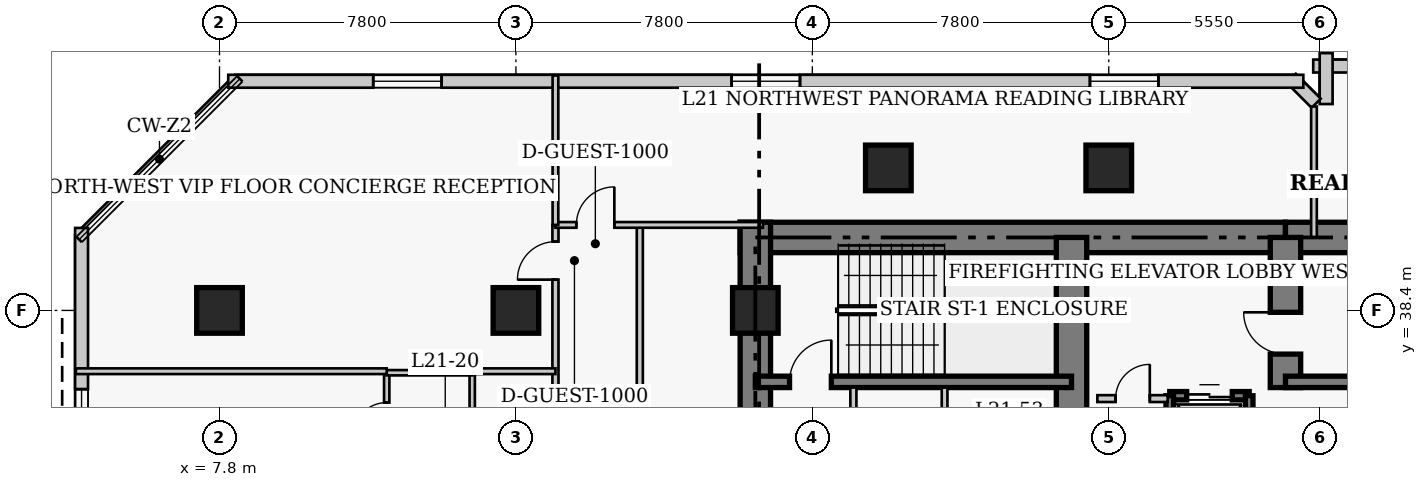
"""IFC4 building model, lengths in metres.
Left out: names, types, materials, properties, quantities, classifications, styles, units other than length and angle.
Written with IfcOpenShell. Run it as: python <this file> out.ifc"""

import sys

from ifc_helpers import new_model, si_unit, direction, frame, frame_2d, origin, origin_2d, place, context, subcontext, project, spatial, rectangle, extrude, element, fill, save


model = new_model("IFC4")
c1 = context("Model", 3, precision=1e-05, world=origin(), true_north=direction((0.0, 1.0)))
c2 = subcontext(c1, "Body", "Model", "MODEL_VIEW")
j1 = project(units=[si_unit("LENGTHUNIT", "METRE"), si_unit("PLANEANGLEUNIT", "RADIAN")], contexts=[c1])
p1 = place(None, origin())
s1 = spatial("IfcSite", under=j1, at=p1, CompositionType="ELEMENT")
p2 = place(p1, origin())
s2 = spatial("IfcBuilding", under=s1, at=p2, CompositionType="ELEMENT")
p3 = place(p2, frame((0.0, 0.0, 88.0)))
s3 = spatial("IfcBuildingStorey", under=s2, at=p3, CompositionType="ELEMENT", Elevation=88.0)
p4 = place(p3, frame((21.5, 40.32, 0.0), z_axis=(0.0, 0.0, 1.0), x_axis=(1.0, 0.0, 0.0)))
e1 = element("IfcWall", 1, at=p4, inside=s3, PredefinedType="SHEAR", context=c2, shape_type="SweptSolid", body=[
    extrude(rectangle(XDim=14.35, YDim=0.8, at=frame_2d((7.175, 0.0))), origin(), (0.0, 0.0, 1.0), 3.8),
])
p5 = place(p3, frame((35.85, 40.32, 0.0), z_axis=(0.0, 0.0, 1.0), x_axis=(1.0, 0.0, 0.0)))
e2 = element("IfcWall", 2, at=p5, inside=s3, PredefinedType="SHEAR", context=c2, shape_type="SweptSolid", body=[
    extrude(rectangle(XDim=12.6, YDim=0.8, at=frame_2d((6.3, 0.0))), origin(), (0.0, 0.0, 1.0), 3.8),
])
p6 = place(p3, frame((21.9, 27.05, 0.0), z_axis=(0.0, 0.0, 1.0), x_axis=(0.0, 1.0, 0.0)))
e3 = element("IfcWall", 3, at=p6, inside=s3, PredefinedType="SHEAR", context=c2, shape_type="SweptSolid", body=[
    extrude(rectangle(XDim=13.67, YDim=0.8, at=frame_2d((6.835, 0.0))), origin(), (0.0, 0.0, 1.0), 3.8),
])
p7 = place(p3, frame((30.22, 33.15, 0.0), z_axis=(0.0, 0.0, 1.0), x_axis=(0.0, 1.0, 0.0)))
e4 = element("IfcWall", 4, at=p7, inside=s3, PredefinedType="SHEAR", context=c2, shape_type="SweptSolid", body=[
    extrude(rectangle(XDim=7.17, YDim=0.8, at=frame_2d((3.585, 0.0))), origin(), (0.0, 0.0, 1.0), 3.8),
])
p8 = place(p3, frame((35.85, 36.37, 0.0), z_axis=(0.0, 0.0, 1.0), x_axis=(0.0, 1.0, 0.0)))
e5 = element("IfcWall", 5, at=p8, inside=s3, PredefinedType="SHEAR", context=c2, shape_type="SweptSolid", body=[
    extrude(rectangle(XDim=3.95, YDim=0.8, at=frame_2d((1.975, 0.0))), origin(), (0.0, 0.0, 1.0), 3.8),
])
p9 = place(p8, frame((0.88, 0.0, 0.0)))
e6 = element("IfcOpeningElement", 6, at=p9, cuts=e5, PredefinedType="OPENING", context=c2, shape_type="SweptSolid", body=[
    extrude(rectangle(XDim=1.1, YDim=2.15, at=frame_2d((0.55, 1.075))), frame((0.0, 0.41, 0.0), z_axis=(0.0, -1.0, 0.0), x_axis=(1.0, 0.0, 0.0)), (0.0, 0.0, 1.0), 0.82),
])
p10 = place(p3, frame((21.9, 36.52, 0.0), z_axis=(0.0, 0.0, 1.0), x_axis=(1.0, 0.0, 0.0)))
e7 = element("IfcWall", 7, at=p10, inside=s3, PredefinedType="SHEAR", context=c2, shape_type="SweptSolid", body=[
    extrude(rectangle(XDim=8.32, YDim=0.3, at=frame_2d((4.16, 0.0))), origin(), (0.0, 0.0, 1.0), 3.8),
])
p11 = place(p10, frame((0.9, 0.0, 0.0)))
e8 = element("IfcOpeningElement", 8, at=p11, cuts=e7, PredefinedType="OPENING", context=c2, shape_type="SweptSolid", body=[
    extrude(rectangle(XDim=1.1, YDim=2.15, at=frame_2d((0.55, 1.075))), frame((0.0, 0.16, 0.0), z_axis=(0.0, -1.0, 0.0), x_axis=(1.0, 0.0, 0.0)), (0.0, 0.0, 1.0), 0.32),
])
p12 = place(p3, frame((35.85, 36.52, 0.0), z_axis=(0.0, 0.0, 1.0), x_axis=(1.0, 0.0, 0.0)))
e9 = element("IfcWall", 9, at=p12, inside=s3, PredefinedType="SHEAR", context=c2, shape_type="SweptSolid", body=[
    extrude(rectangle(XDim=8.33, YDim=0.3, at=frame_2d((4.165, 0.0))), origin(), (0.0, 0.0, 1.0), 3.8),
])
for number, where, z_axis, x_axis in (
    (10, (7.8, 38.4, 0.0), (0.0, 0.0, 1.0), (1.0, 0.0, 0.0)),
    (11, (15.6, 38.4, 0.0), (0.0, 0.0, 1.0), (1.0, 0.0, 0.0)),
    (12, (21.9, 38.4, 0.0), (0.0, 0.0, 1.0), (1.0, 0.0, 0.0)),
    (13, (25.4, 42.15, 0.0), (0.0, 0.0, 1.0), (1.0, 0.0, 0.0)),
    (14, (31.2, 42.15, 0.0), (0.0, 0.0, 1.0), (1.0, 0.0, 0.0)),
):
    element("IfcColumn", number, at=place(p3, frame(where, z_axis=z_axis, x_axis=x_axis)), inside=s3, PredefinedType="COLUMN", context=c2, shape_type="SweptSolid", body=[
        extrude(rectangle(XDim=1.2, YDim=1.2, at=origin_2d()), origin(), (0.0, 0.0, 1.0), 3.8),
    ])
p13 = place(p3, frame((41.42, 44.83, 0.0), z_axis=(0.0, 0.0, 1.0), x_axis=(-1.0, 0.0, 0.0)))
e15 = element("IfcWall", 15, at=p13, inside=s3, PredefinedType="SOLIDWALL", context=c2, shape_type="SweptSolid", body=[
    extrude(rectangle(XDim=4.84, YDim=0.34, at=frame_2d((2.42, 0.0))), origin(), (0.0, 0.0, 1.0), 3.54),
])
p14 = place(p13, frame((1.52, 0.0, 0.85)))
e16 = element("IfcOpeningElement", 16, at=p14, cuts=e15, PredefinedType="OPENING", context=c2, shape_type="SweptSolid", body=[
    extrude(rectangle(XDim=1.8, YDim=1.8, at=frame_2d((0.9, 0.9))), frame((0.0, 0.18, 0.0), z_axis=(0.0, -1.0, 0.0), x_axis=(1.0, 0.0, 0.0)), (0.0, 0.0, 1.0), 0.36),
])
p15 = place(p3, frame((36.92, 45.17, 0.0), z_axis=(0.0, 0.0, 1.0), x_axis=(0.0, -1.0, 0.0)))
e17 = element("IfcWall", 17, at=p15, inside=s3, PredefinedType="SOLIDWALL", context=c2, shape_type="SweptSolid", body=[
    extrude(rectangle(XDim=1.34, YDim=0.34, at=frame_2d((0.67, 0.0))), origin(), (0.0, 0.0, 1.0), 3.54),
])
p16 = place(p3, frame((36.658, 43.852, 0.0), z_axis=(0.0, 0.0, 1.0), x_axis=(-0.707238225886, 0.706975312048, 0.0)))
e18 = element("IfcWall", 18, at=p16, inside=s3, PredefinedType="SOLIDWALL", context=c2, shape_type="SweptSolid", body=[
    extrude(rectangle(XDim=0.929, YDim=0.34, at=frame_2d((0.464, 0.0))), origin(), (0.0, 0.0, 1.0), 3.54),
])
p17 = place(p3, frame((36.32, 44.43, 0.0), z_axis=(0.0, 0.0, 1.0), x_axis=(-1.0, 0.0, 0.0)))
e19 = element("IfcWall", 19, at=p17, inside=s3, PredefinedType="SOLIDWALL", context=c2, shape_type="SweptSolid", body=[
    extrude(rectangle(XDim=28.29, YDim=0.34, at=frame_2d((14.145, 0.0))), origin(), (0.0, 0.0, 1.0), 3.54),
])
p18 = place(p17, frame((3.815, 0.0, 0.85)))
e20 = element("IfcOpeningElement", 20, at=p18, cuts=e19, PredefinedType="OPENING", context=c2, shape_type="SweptSolid", body=[
    extrude(rectangle(XDim=1.8, YDim=1.8, at=frame_2d((0.9, 0.9))), frame((0.0, 0.18, 0.0), z_axis=(0.0, -1.0, 0.0), x_axis=(1.0, 0.0, 0.0)), (0.0, 0.0, 1.0), 0.36),
])
p19 = place(p17, frame((13.245, 0.0, 0.85)))
e21 = element("IfcOpeningElement", 21, at=p19, cuts=e19, PredefinedType="OPENING", context=c2, shape_type="SweptSolid", body=[
    extrude(rectangle(XDim=1.8, YDim=1.8, at=frame_2d((0.9, 0.9))), frame((0.0, 0.18, 0.0), z_axis=(0.0, -1.0, 0.0), x_axis=(1.0, 0.0, 0.0)), (0.0, 0.0, 1.0), 0.36),
])
p20 = place(p17, frame((22.675, 0.0, 0.85)))
e22 = element("IfcOpeningElement", 22, at=p20, cuts=e19, PredefinedType="OPENING", context=c2, shape_type="SweptSolid", body=[
    extrude(rectangle(XDim=1.8, YDim=1.8, at=frame_2d((0.9, 0.9))), frame((0.0, 0.18, 0.0), z_axis=(0.0, -1.0, 0.0), x_axis=(1.0, 0.0, 0.0)), (0.0, 0.0, 1.0), 0.36),
])
p21 = place(p3, frame((4.17, 40.57, 0.0), z_axis=(0.0, 0.0, 1.0), x_axis=(0.0, -1.0, 0.0)))
e23 = element("IfcWall", 23, at=p21, inside=s3, PredefinedType="SOLIDWALL", context=c2, shape_type="SweptSolid", body=[
    extrude(rectangle(XDim=31.94, YDim=0.34, at=frame_2d((15.97, 0.0))), origin(), (0.0, 0.0, 1.0), 3.54),
])
p22 = place(p21, frame((4.242, 0.0, 0.85)))
e24 = element("IfcOpeningElement", 24, at=p22, cuts=e23, PredefinedType="OPENING", context=c2, shape_type="SweptSolid", body=[
    extrude(rectangle(XDim=1.8, YDim=1.8, at=frame_2d((0.9, 0.9))), frame((0.0, 0.18, 0.0), z_axis=(0.0, -1.0, 0.0), x_axis=(1.0, 0.0, 0.0)), (0.0, 0.0, 1.0), 0.36),
])
p23 = place(p21, frame((12.228, 0.0, 0.85)))
e25 = element("IfcOpeningElement", 25, at=p23, cuts=e23, PredefinedType="OPENING", context=c2, shape_type="SweptSolid", body=[
    extrude(rectangle(XDim=1.8, YDim=1.8, at=frame_2d((0.9, 0.9))), frame((0.0, 0.18, 0.0), z_axis=(0.0, -1.0, 0.0), x_axis=(1.0, 0.0, 0.0)), (0.0, 0.0, 1.0), 0.36),
])
p24 = place(p21, frame((18.413, 0.0, 0.85)))
e26 = element("IfcOpeningElement", 26, at=p24, cuts=e23, PredefinedType="OPENING", context=c2, shape_type="SweptSolid", body=[
    extrude(rectangle(XDim=1.8, YDim=1.8, at=frame_2d((0.9, 0.9))), frame((0.0, 0.18, 0.0), z_axis=(0.0, -1.0, 0.0), x_axis=(1.0, 0.0, 0.0)), (0.0, 0.0, 1.0), 0.36),
])
p25 = place(p21, frame((27.048, 0.0, 0.85)))
e27 = element("IfcOpeningElement", 27, at=p25, cuts=e23, PredefinedType="OPENING", context=c2, shape_type="SweptSolid", body=[
    extrude(rectangle(XDim=1.8, YDim=1.8, at=frame_2d((0.9, 0.9))), frame((0.0, 0.18, 0.0), z_axis=(0.0, -1.0, 0.0), x_axis=(1.0, 0.0, 0.0)), (0.0, 0.0, 1.0), 0.36),
])
p26 = place(p3, frame((32.805, 36.155, 0.0), z_axis=(0.0, 0.0, 1.0), x_axis=(1.0, 0.0, 0.0)))
e28 = element("IfcWall", 28, at=p26, inside=s3, PredefinedType="SHEAR", context=c2, shape_type="SweptSolid", body=[
    extrude(rectangle(XDim=2.09, YDim=0.22, at=frame_2d((1.045, 0.0))), origin(), (0.0, 0.0, 1.0), 3.8),
])
p27 = place(p26, frame((0.445, 0.0, 0.0)))
e29 = element("IfcOpeningElement", 29, at=p27, cuts=e28, PredefinedType="OPENING", context=c2, shape_type="SweptSolid", body=[
    extrude(rectangle(XDim=1.2, YDim=2.15, at=frame_2d((0.6, 1.075))), frame((0.0, 0.12, 0.0), z_axis=(0.0, -1.0, 0.0), x_axis=(1.0, 0.0, 0.0)), (0.0, 0.0, 1.0), 0.24),
])
for number, where, z_axis, x_axis in (
    (30, (32.805, 33.245, 0.0), (0.0, 0.0, 1.0), (0.0, 1.0, 0.0)),
    (31, (34.895, 33.245, 0.0), (0.0, 0.0, 1.0), (0.0, 1.0, 0.0)),
):
    element("IfcWall", number, at=place(p3, frame(where, z_axis=z_axis, x_axis=x_axis)), inside=s3, PredefinedType="SHEAR", context=c2, shape_type="SweptSolid", body=[
        extrude(rectangle(XDim=2.91, YDim=0.2, at=frame_2d((1.455, 0.0))), origin(), (0.0, 0.0, 1.0), 3.8),
    ])
p28 = place(p3, frame((30.9, 36.08, 0.0), z_axis=(0.0, 0.0, 1.0), x_axis=(1.0, 0.0, 0.0)))
e32 = element("IfcWall", 32, at=p28, inside=s3, PredefinedType="PARTITIONING", context=c2, shape_type="SweptSolid", body=[
    extrude(rectangle(XDim=1.85, YDim=0.18, at=frame_2d((0.925, 0.0))), origin(), (0.0, 0.0, 1.0), 3.54),
])
p29 = place(p28, frame((0.48, 0.0, 0.0)))
e33 = element("IfcOpeningElement", 33, at=p29, cuts=e32, PredefinedType="OPENING", context=c2, shape_type="SweptSolid", body=[
    extrude(rectangle(XDim=0.9, YDim=2.15, at=frame_2d((0.45, 1.075))), frame((0.0, 0.1, 0.0), z_axis=(0.0, -1.0, 0.0), x_axis=(1.0, 0.0, 0.0)), (0.0, 0.0, 1.0), 0.2),
])
p30 = place(p3, frame((24.48, 32.8, 0.0), z_axis=(0.0, 0.0, 1.0), x_axis=(0.0, 1.0, 0.0)))
e34 = element("IfcWall", 34, at=p30, inside=s3, PredefinedType="PARTITIONING", context=c2, shape_type="SweptSolid", body=[
    extrude(rectangle(XDim=3.57, YDim=0.16, at=frame_2d((1.785, 0.0))), origin(), (0.0, 0.0, 1.0), 3.54),
])
p31 = place(p30, frame((1.604, 0.0, 0.0)))
e35 = element("IfcOpeningElement", 35, at=p31, cuts=e34, PredefinedType="OPENING", context=c2, shape_type="SweptSolid", body=[
    extrude(rectangle(XDim=0.9, YDim=2.1, at=frame_2d((0.45, 1.05))), frame((0.0, 0.09, 0.0), z_axis=(0.0, -1.0, 0.0), x_axis=(1.0, 0.0, 0.0)), (0.0, 0.0, 1.0), 0.18),
])
p32 = place(p3, frame((26.88, 32.75, 0.0), z_axis=(0.0, 0.0, 1.0), x_axis=(0.0, 1.0, 0.0)))
e36 = element("IfcWall", 36, at=p32, inside=s3, PredefinedType="PARTITIONING", context=c2, shape_type="SweptSolid", body=[
    extrude(rectangle(XDim=3.62, YDim=0.15, at=frame_2d((1.81, 0.0))), origin(), (0.0, 0.0, 1.0), 3.54),
])
p33 = place(p3, frame((16.64, 6.65, 0.0), z_axis=(0.0, 0.0, 1.0), x_axis=(0.0, 1.0, 0.0)))
e37 = element("IfcWall", 37, at=p33, inside=s3, PredefinedType="PARTITIONING", context=c2, shape_type="SweptSolid", body=[
    extrude(rectangle(XDim=34.0, YDim=0.16, at=frame_2d((17.0, 0.0))), origin(), (0.0, 0.0, 1.0), 3.54),
])
p34 = place(p33, frame((1.8, 0.0, 0.0)))
e38 = element("IfcOpeningElement", 38, at=p34, cuts=e37, PredefinedType="OPENING", context=c2, shape_type="SweptSolid", body=[
    extrude(rectangle(XDim=0.95, YDim=2.1, at=frame_2d((0.475, 1.05))), frame((0.0, 0.09, 0.0), z_axis=(0.0, -1.0, 0.0), x_axis=(1.0, 0.0, 0.0)), (0.0, 0.0, 1.0), 0.18),
])
p35 = place(p33, frame((8.475, 0.0, 0.0)))
e39 = element("IfcOpeningElement", 39, at=p35, cuts=e37, PredefinedType="OPENING", context=c2, shape_type="SweptSolid", body=[
    extrude(rectangle(XDim=0.95, YDim=2.1, at=frame_2d((0.475, 1.05))), frame((0.0, 0.09, 0.0), z_axis=(0.0, -1.0, 0.0), x_axis=(1.0, 0.0, 0.0)), (0.0, 0.0, 1.0), 0.18),
])
p36 = place(p33, frame((17.275, 0.0, 0.0)))
e40 = element("IfcOpeningElement", 40, at=p36, cuts=e37, PredefinedType="OPENING", context=c2, shape_type="SweptSolid", body=[
    extrude(rectangle(XDim=0.95, YDim=2.1, at=frame_2d((0.475, 1.05))), frame((0.0, 0.09, 0.0), z_axis=(0.0, -1.0, 0.0), x_axis=(1.0, 0.0, 0.0)), (0.0, 0.0, 1.0), 0.18),
])
p37 = place(p33, frame((25.675, 0.0, 0.0)))
e41 = element("IfcOpeningElement", 41, at=p37, cuts=e37, PredefinedType="OPENING", context=c2, shape_type="SweptSolid", body=[
    extrude(rectangle(XDim=0.95, YDim=2.1, at=frame_2d((0.475, 1.05))), frame((0.0, 0.09, 0.0), z_axis=(0.0, -1.0, 0.0), x_axis=(1.0, 0.0, 0.0)), (0.0, 0.0, 1.0), 0.18),
])
p38 = place(p33, frame((32.56, 0.0, 0.0)))
e42 = element("IfcOpeningElement", 42, at=p38, cuts=e37, PredefinedType="OPENING", context=c2, shape_type="SweptSolid", body=[
    extrude(rectangle(XDim=1.0, YDim=2.15, at=frame_2d((0.5, 1.075))), frame((0.0, 0.09, 0.0), z_axis=(0.0, -1.0, 0.0), x_axis=(1.0, 0.0, 0.0)), (0.0, 0.0, 1.0), 0.18),
])
p39 = place(p3, frame((18.86, 35.02, 0.0), z_axis=(0.0, 0.0, 1.0), x_axis=(0.0, 1.0, 0.0)))
e43 = element("IfcWall", 43, at=p39, inside=s3, PredefinedType="PARTITIONING", context=c2, shape_type="SweptSolid", body=[
    extrude(rectangle(XDim=5.63, YDim=0.16, at=frame_2d((2.815, 0.0))), origin(), (0.0, 0.0, 1.0), 3.54),
])
p40 = place(p3, frame((16.64, 40.65, 0.0), z_axis=(0.0, 0.0, 1.0), x_axis=(1.0, 0.0, 0.0)))
e44 = element("IfcWall", 44, at=p40, inside=s3, PredefinedType="PARTITIONING", context=c2, shape_type="SweptSolid", body=[
    extrude(rectangle(XDim=5.46, YDim=0.15, at=frame_2d((2.73, 0.0))), origin(), (0.0, 0.0, 1.0), 3.54),
])
p41 = place(p40, frame((0.55, 0.0, 0.0)))
e45 = element("IfcOpeningElement", 45, at=p41, cuts=e44, PredefinedType="OPENING", context=c2, shape_type="SweptSolid", body=[
    extrude(rectangle(XDim=1.0, YDim=2.15, at=frame_2d((0.5, 1.075))), frame((0.0, 0.085, 0.0), z_axis=(0.0, -1.0, 0.0), x_axis=(1.0, 0.0, 0.0)), (0.0, 0.0, 1.0), 0.17),
])
p42 = place(p3, frame((16.64, 40.65, 0.0), z_axis=(0.0, 0.0, 1.0), x_axis=(0.0, 1.0, 0.0)))
e46 = element("IfcWall", 46, at=p42, inside=s3, PredefinedType="PARTITIONING", context=c2, shape_type="SweptSolid", body=[
    extrude(rectangle(XDim=3.93, YDim=0.15, at=frame_2d((1.965, 0.0))), origin(), (0.0, 0.0, 1.0), 3.54),
])
p43 = place(p3, frame((36.6, 40.32, 0.0), z_axis=(0.0, 0.0, 1.0), x_axis=(0.0, 1.0, 0.0)))
e47 = element("IfcWall", 47, at=p43, inside=s3, PredefinedType="PARTITIONING", context=c2, shape_type="SweptSolid", body=[
    extrude(rectangle(XDim=3.445, YDim=0.15, at=frame_2d((1.723, 0.0))), origin(), (0.0, 0.0, 1.0), 3.54),
])
p44 = place(p3, frame((12.2, 34.31, 0.0), z_axis=(0.0, 0.0, 1.0), x_axis=(0.0, 1.0, 0.0)))
e48 = element("IfcWall", 48, at=p44, inside=s3, PredefinedType="PLUMBINGWALL", context=c2, shape_type="SweptSolid", body=[
    extrude(rectangle(XDim=2.45, YDim=0.14, at=frame_2d((1.225, 0.0))), origin(), (0.0, 0.0, 1.0), 3.54),
])
p45 = place(p44, frame((0.785, 0.0, 0.0)))
e49 = element("IfcOpeningElement", 49, at=p45, cuts=e48, PredefinedType="OPENING", context=c2, shape_type="SweptSolid", body=[
    extrude(rectangle(XDim=0.88, YDim=2.05, at=frame_2d((0.44, 1.025))), frame((0.0, 0.08, 0.0), z_axis=(0.0, -1.0, 0.0), x_axis=(1.0, 0.0, 0.0)), (0.0, 0.0, 1.0), 0.16),
])
p46 = place(p3, frame((14.45, 34.31, 0.0), z_axis=(0.0, 0.0, 1.0), x_axis=(0.0, 1.0, 0.0)))
e50 = element("IfcWall", 50, at=p46, inside=s3, PredefinedType="PLUMBINGWALL", context=c2, shape_type="SweptSolid", body=[
    extrude(rectangle(XDim=2.45, YDim=0.14, at=frame_2d((1.225, 0.0))), origin(), (0.0, 0.0, 1.0), 3.54),
])
p47 = place(p3, frame((12.2, 36.76, 0.0), z_axis=(0.0, 0.0, 1.0), x_axis=(1.0, 0.0, 0.0)))
e51 = element("IfcWall", 51, at=p47, inside=s3, PredefinedType="PLUMBINGWALL", context=c2, shape_type="SweptSolid", body=[
    extrude(rectangle(XDim=2.25, YDim=0.14, at=frame_2d((1.125, 0.0))), origin(), (0.0, 0.0, 1.0), 3.54),
])
p48 = place(p3, frame((4.02, 36.8, 0.0), z_axis=(0.0, 0.0, 1.0), x_axis=(1.0, 0.0, 0.0)))
e52 = element("IfcWall", 52, at=p48, inside=s3, PredefinedType="PARTITIONING", context=c2, shape_type="SweptSolid", body=[
    extrude(rectangle(XDim=8.18, YDim=0.15, at=frame_2d((4.09, 0.0))), origin(), (0.0, 0.0, 1.0), 3.54),
])
p49 = place(p3, frame((14.45, 36.8, 0.0), z_axis=(0.0, 0.0, 1.0), x_axis=(1.0, 0.0, 0.0)))
e53 = element("IfcWall", 53, at=p49, inside=s3, PredefinedType="PARTITIONING", context=c2, shape_type="SweptSolid", body=[
    extrude(rectangle(XDim=2.19, YDim=0.15, at=frame_2d((1.095, 0.0))), origin(), (0.0, 0.0, 1.0), 3.54),
])
p50 = place(p18, origin())
e54 = element("IfcWindow", 54, at=p50, inside=s3, PartitioningType="SINGLE_PANEL", PredefinedType="WINDOW", context=c2, shape_type="SweptSolid", body=[
    extrude(rectangle(XDim=1.8, YDim=1.8, at=frame_2d((0.9, 0.9))), frame((0.0, 0.03, 0.0), z_axis=(0.0, -1.0, 0.0), x_axis=(1.0, 0.0, 0.0)), (0.0, 0.0, 1.0), 0.06),
])
fill(e20, e54)
p51 = place(p19, origin())
e55 = element("IfcWindow", 55, at=p51, inside=s3, PartitioningType="SINGLE_PANEL", PredefinedType="WINDOW", context=c2, shape_type="SweptSolid", body=[
    extrude(rectangle(XDim=1.8, YDim=1.8, at=frame_2d((0.9, 0.9))), frame((0.0, 0.03, 0.0), z_axis=(0.0, -1.0, 0.0), x_axis=(1.0, 0.0, 0.0)), (0.0, 0.0, 1.0), 0.06),
])
fill(e21, e55)
p52 = place(p20, origin())
e56 = element("IfcWindow", 56, at=p52, inside=s3, PartitioningType="SINGLE_PANEL", PredefinedType="WINDOW", context=c2, shape_type="SweptSolid", body=[
    extrude(rectangle(XDim=1.8, YDim=1.8, at=frame_2d((0.9, 0.9))), frame((0.0, 0.03, 0.0), z_axis=(0.0, -1.0, 0.0), x_axis=(1.0, 0.0, 0.0)), (0.0, 0.0, 1.0), 0.06),
])
fill(e22, e56)
p53 = place(p22, origin())
e57 = element("IfcWindow", 57, at=p53, inside=s3, PartitioningType="SINGLE_PANEL", PredefinedType="WINDOW", context=c2, shape_type="SweptSolid", body=[
    extrude(rectangle(XDim=1.8, YDim=1.8, at=frame_2d((0.9, 0.9))), frame((0.0, 0.03, 0.0), z_axis=(0.0, -1.0, 0.0), x_axis=(1.0, 0.0, 0.0)), (0.0, 0.0, 1.0), 0.06),
])
fill(e24, e57)
p54 = place(p27, origin())
e58 = element("IfcDoor", 58, at=p54, inside=s3, OperationType="DOUBLE_DOOR_SLIDING", PredefinedType="DOOR", context=c2, shape_type="SweptSolid", body=[
    extrude(rectangle(XDim=1.2, YDim=2.15, at=frame_2d((0.6, 1.075))), frame((0.0, 0.025, 0.0), z_axis=(0.0, -1.0, 0.0), x_axis=(1.0, 0.0, 0.0)), (0.0, 0.0, 1.0), 0.05),
])
fill(e29, e58)
p55 = place(p29, origin())
e59 = element("IfcDoor", 59, at=p55, inside=s3, OperationType="SINGLE_SWING_RIGHT", PredefinedType="DOOR", context=c2, shape_type="SweptSolid", body=[
    extrude(rectangle(XDim=0.9, YDim=2.15, at=frame_2d((0.45, 1.075))), frame((0.0, 0.025, 0.0), z_axis=(0.0, -1.0, 0.0), x_axis=(1.0, 0.0, 0.0)), (0.0, 0.0, 1.0), 0.05),
])
fill(e33, e59)
p56 = place(p41, origin())
e60 = element("IfcDoor", 60, at=p56, inside=s3, OperationType="SINGLE_SWING_RIGHT", PredefinedType="DOOR", context=c2, shape_type="SweptSolid", body=[
    extrude(rectangle(XDim=1.0, YDim=2.15, at=frame_2d((0.5, 1.075))), frame((0.0, 0.025, 0.0), z_axis=(0.0, -1.0, 0.0), x_axis=(1.0, 0.0, 0.0)), (0.0, 0.0, 1.0), 0.05),
])
fill(e45, e60)
p57 = place(p45, origin())
e61 = element("IfcDoor", 61, at=p57, inside=s3, OperationType="SINGLE_SWING_LEFT", PredefinedType="DOOR", context=c2, shape_type="SweptSolid", body=[
    extrude(rectangle(XDim=0.88, YDim=2.05, at=frame_2d((0.44, 1.025))), frame((0.0, 0.025, 0.0), z_axis=(0.0, -1.0, 0.0), x_axis=(1.0, 0.0, 0.0)), (0.0, 0.0, 1.0), 0.05),
])
fill(e49, e61)
p58 = place(p38, origin())
e62 = element("IfcDoor", 62, at=p58, inside=s3, OperationType="SINGLE_SWING_LEFT", PredefinedType="DOOR", context=c2, shape_type="SweptSolid", body=[
    extrude(rectangle(XDim=1.0, YDim=2.15, at=frame_2d((0.5, 1.075))), frame((0.0, 0.025, 0.0), z_axis=(0.0, -1.0, 0.0), x_axis=(1.0, 0.0, 0.0)), (0.0, 0.0, 1.0), 0.05),
])
fill(e42, e62)
p59 = place(p11, origin())
e63 = element("IfcDoor", 63, at=p59, inside=s3, OperationType="SINGLE_SWING_RIGHT", PredefinedType="DOOR", context=c2, shape_type="SweptSolid", body=[
    extrude(rectangle(XDim=1.1, YDim=2.15, at=frame_2d((0.55, 1.075))), frame((0.0, 0.025, 0.0), z_axis=(0.0, -1.0, 0.0), x_axis=(1.0, 0.0, 0.0)), (0.0, 0.0, 1.0), 0.05),
])
fill(e8, e63)
p60 = place(p9, origin())
e64 = element("IfcDoor", 64, at=p60, inside=s3, OperationType="SINGLE_SWING_RIGHT", PredefinedType="DOOR", context=c2, shape_type="SweptSolid", body=[
    extrude(rectangle(XDim=1.1, YDim=2.15, at=frame_2d((0.55, 1.075))), frame((0.0, 0.025, 0.0), z_axis=(0.0, -1.0, 0.0), x_axis=(1.0, 0.0, 0.0)), (0.0, 0.0, 1.0), 0.05),
])
fill(e6, e64)
save(model, sys.argv[1])
